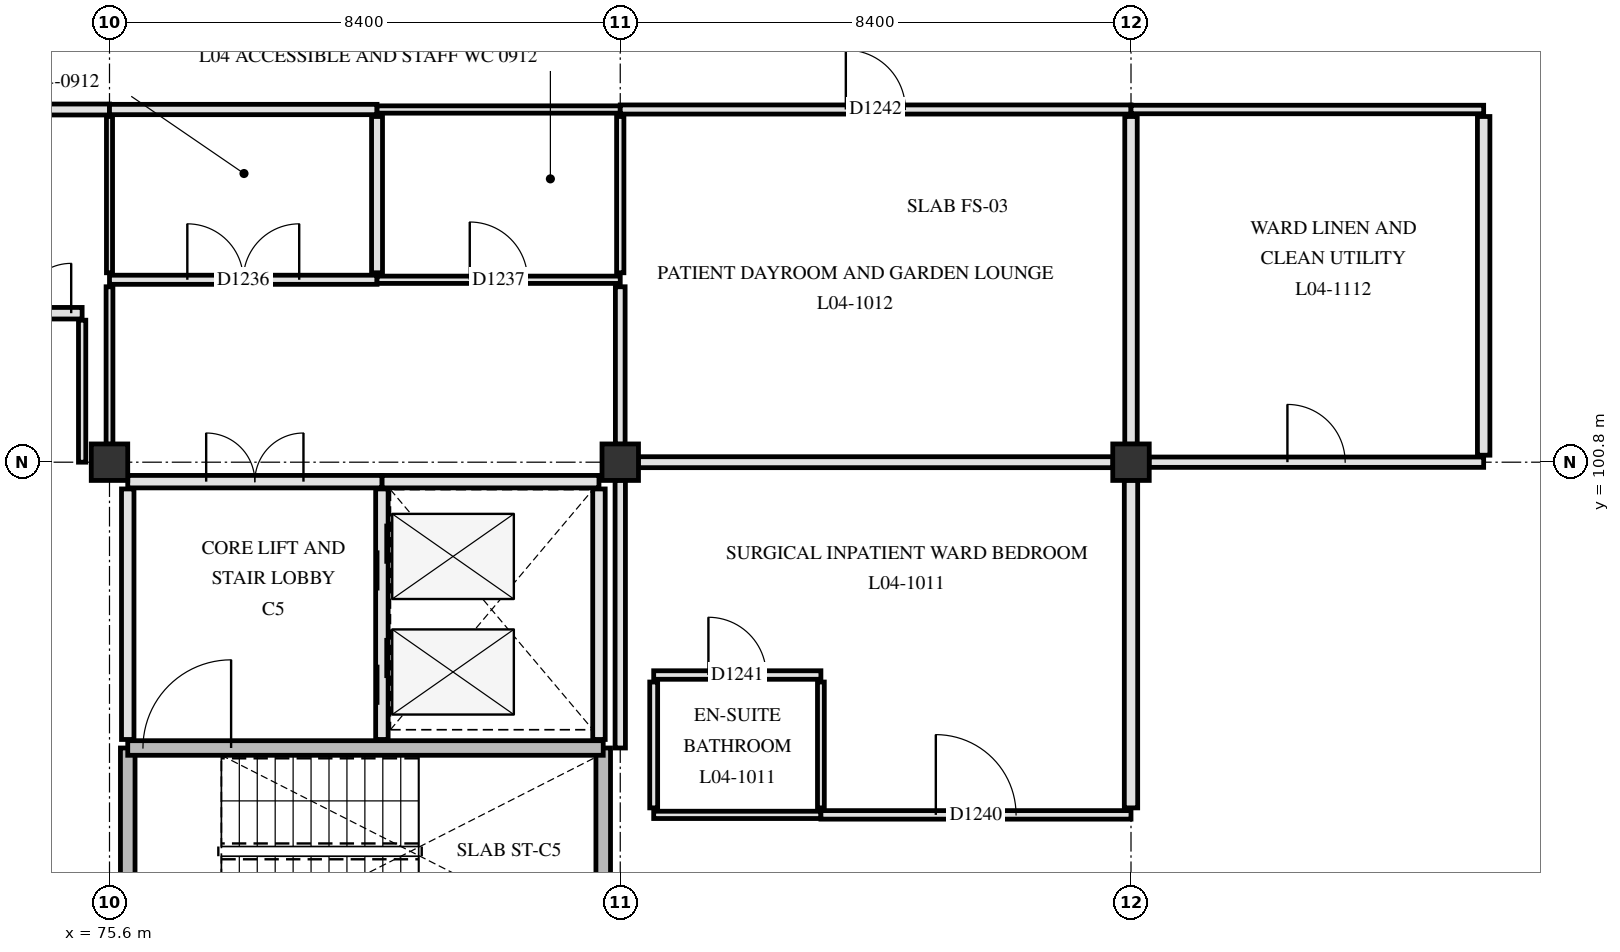
"""IFC4 building model, lengths in metres.
Left out: names, types, materials, properties, quantities, classifications, styles, units other than length and angle.
Written with IfcOpenShell. Run it as: python <this file> out.ifc"""

import sys

from ifc_helpers import new_model, si_unit, direction, frame, frame_2d, origin, origin_2d, place, context, subcontext, project, spatial, rectangle, extrude, element, fill, save


model = new_model("IFC4")
c1 = context("Model", 3, precision=1e-05, world=origin(), true_north=direction((0.0, 1.0)))
c2 = subcontext(c1, "Body", "Model", "MODEL_VIEW")
j1 = project(units=[si_unit("LENGTHUNIT", "METRE"), si_unit("PLANEANGLEUNIT", "RADIAN")], contexts=[c1])
p1 = place(None, origin())
s1 = spatial("IfcSite", under=j1, at=p1, CompositionType="ELEMENT")
p2 = place(p1, origin())
s2 = spatial("IfcBuilding", under=s1, at=p2, CompositionType="ELEMENT")
p3 = place(p2, frame((0.0, 0.0, 18.6)))
s3 = spatial("IfcBuildingStorey", under=s2, at=p3, CompositionType="ELEMENT", Elevation=18.6)
for number, where, z_axis, x_axis in (
    (1, (75.6, 100.8, 0.0), (0.0, 0.0, 1.0), (1.0, 0.0, 0.0)),
    (2, (84.0, 100.8, 0.0), (0.0, 0.0, 1.0), (1.0, 0.0, 0.0)),
    (3, (92.4, 100.8, 0.0), (0.0, 0.0, 1.0), (1.0, 0.0, 0.0)),
):
    element("IfcColumn", number, at=place(p3, frame(where, z_axis=z_axis, x_axis=x_axis)), inside=s3, PredefinedType="COLUMN", context=c2, shape_type="SweptSolid", body=[
        extrude(rectangle(XDim=0.6, YDim=0.6, at=origin_2d()), origin(), (0.0, 0.0, 1.0), 3.9),
    ])
for number, where, z_axis, x_axis in (
    (4, (75.9, 92.78, 0.0), (0.0, 0.0, 1.0), (0.0, 1.0, 0.0)),
    (5, (83.72, 92.78, 0.0), (0.0, 0.0, 1.0), (0.0, 1.0, 0.0)),
):
    element("IfcWall", number, at=place(p3, frame(where, z_axis=z_axis, x_axis=x_axis)), inside=s3, PredefinedType="SHEAR", context=c2, shape_type="SweptSolid", body=[
        extrude(rectangle(XDim=3.32, YDim=0.24, at=frame_2d((1.66, 0.0))), origin(), (0.0, 0.0, 1.0), 3.62),
    ])
p4 = place(p3, frame((75.9, 96.1, 0.0), z_axis=(0.0, 0.0, 1.0), x_axis=(1.0, 0.0, 0.0)))
e6 = element("IfcWall", 6, at=p4, inside=s3, PredefinedType="SHEAR", context=c2, shape_type="SweptSolid", body=[
    extrude(rectangle(XDim=7.82, YDim=0.24, at=frame_2d((3.91, 0.0))), origin(), (0.0, 0.0, 1.0), 3.62),
])
p5 = place(p4, frame((0.25, 0.0, 0.0)))
e7 = element("IfcOpeningElement", 7, at=p5, cuts=e6, PredefinedType="OPENING", context=c2, shape_type="SweptSolid", body=[
    extrude(rectangle(XDim=1.45, YDim=2.2, at=frame_2d((0.725, 1.1))), frame((0.0, 0.13, 0.0), z_axis=(0.0, -1.0, 0.0), x_axis=(1.0, 0.0, 0.0)), (0.0, 0.0, 1.0), 0.26),
])
p6 = place(p3, frame((80.08, 96.24, 0.0), z_axis=(0.0, 0.0, 1.0), x_axis=(0.0, 1.0, 0.0)))
e8 = element("IfcWall", 8, at=p6, inside=s3, PredefinedType="PARTITIONING", context=c2, shape_type="SweptSolid", body=[
    extrude(rectangle(XDim=4.12, YDim=0.205, at=frame_2d((2.06, 0.0))), origin(), (0.0, 0.0, 1.0), 3.61),
])
p7 = place(p6, frame((0.57, 0.0, 0.0)))
e9 = element("IfcOpeningElement", 9, at=p7, cuts=e8, PredefinedType="OPENING", context=c2, shape_type="SweptSolid", body=[
    extrude(rectangle(XDim=1.1, YDim=2.15, at=frame_2d((0.55, 1.075))), frame((0.0, 0.113, 0.0), z_axis=(0.0, -1.0, 0.0), x_axis=(1.0, 0.0, 0.0)), (0.0, 0.0, 1.0), 0.225),
])
p8 = place(p6, frame((2.45, 0.0, 0.0)))
e10 = element("IfcOpeningElement", 10, at=p8, cuts=e8, PredefinedType="OPENING", context=c2, shape_type="SweptSolid", body=[
    extrude(rectangle(XDim=1.1, YDim=2.15, at=frame_2d((0.55, 1.075))), frame((0.0, 0.113, 0.0), z_axis=(0.0, -1.0, 0.0), x_axis=(1.0, 0.0, 0.0)), (0.0, 0.0, 1.0), 0.225),
])
p9 = place(p3, frame((83.65, 96.24, 0.0), z_axis=(0.0, 0.0, 1.0), x_axis=(0.0, 1.0, 0.0)))
e11 = element("IfcWall", 11, at=p9, inside=s3, PredefinedType="PARTITIONING", context=c2, shape_type="SweptSolid", body=[
    extrude(rectangle(XDim=4.12, YDim=0.205, at=frame_2d((2.06, 0.0))), origin(), (0.0, 0.0, 1.0), 3.61),
])
p10 = place(p3, frame((80.08, 100.48, 0.0), z_axis=(0.0, 0.0, 1.0), x_axis=(1.0, 0.0, 0.0)))
e12 = element("IfcWall", 12, at=p10, inside=s3, PredefinedType="PARTITIONING", context=c2, shape_type="SweptSolid", body=[
    extrude(rectangle(XDim=3.57, YDim=0.205, at=frame_2d((1.785, 0.0))), origin(), (0.0, 0.0, 1.0), 3.61),
])
p11 = place(p3, frame((75.9, 96.24, 0.0), z_axis=(0.0, 0.0, 1.0), x_axis=(0.0, 1.0, 0.0)))
e13 = element("IfcWall", 13, at=p11, inside=s3, PredefinedType="PARTITIONING", context=c2, shape_type="SweptSolid", body=[
    extrude(rectangle(XDim=4.12, YDim=0.205, at=frame_2d((2.06, 0.0))), origin(), (0.0, 0.0, 1.0), 3.61),
])
p12 = place(p3, frame((75.9, 100.48, 0.0), z_axis=(0.0, 0.0, 1.0), x_axis=(1.0, 0.0, 0.0)))
e14 = element("IfcWall", 14, at=p12, inside=s3, PredefinedType="PARTITIONING", context=c2, shape_type="SweptSolid", body=[
    extrude(rectangle(XDim=4.18, YDim=0.205, at=frame_2d((2.09, 0.0))), origin(), (0.0, 0.0, 1.0), 3.61),
])
p13 = place(p12, frame((1.29, 0.0, 0.0)))
e15 = element("IfcOpeningElement", 15, at=p13, cuts=e14, PredefinedType="OPENING", context=c2, shape_type="SweptSolid", body=[
    extrude(rectangle(XDim=1.6, YDim=2.25, at=frame_2d((0.8, 1.125))), frame((0.0, 0.113, 0.0), z_axis=(0.0, -1.0, 0.0), x_axis=(1.0, 0.0, 0.0)), (0.0, 0.0, 1.0), 0.225),
])
p14 = place(p3, frame((84.55, 95.0, 0.0), z_axis=(0.0, 0.0, 1.0), x_axis=(1.0, 0.0, 0.0)))
e16 = element("IfcWall", 16, at=p14, inside=s3, PredefinedType="PARTITIONING", context=c2, shape_type="SweptSolid", body=[
    extrude(rectangle(XDim=2.75, YDim=0.12, at=frame_2d((1.375, 0.0))), origin(), (0.0, 0.0, 1.0), 3.61),
])
p15 = place(p3, frame((87.3, 95.0, 0.0), z_axis=(0.0, 0.0, 1.0), x_axis=(1.0, 0.0, 0.0)))
e17 = element("IfcWall", 17, at=p15, inside=s3, PredefinedType="PARTITIONING", context=c2, shape_type="SweptSolid", body=[
    extrude(rectangle(XDim=5.1, YDim=0.14, at=frame_2d((2.55, 0.0))), origin(), (0.0, 0.0, 1.0), 3.26),
])
p16 = place(p15, frame((1.89, 0.0, 0.0)))
e18 = element("IfcOpeningElement", 18, at=p16, cuts=e17, PredefinedType="OPENING", context=c2, shape_type="SweptSolid", body=[
    extrude(rectangle(XDim=1.32, YDim=2.18, at=frame_2d((0.66, 1.09))), frame((0.0, 0.08, 0.0), z_axis=(0.0, -1.0, 0.0), x_axis=(1.0, 0.0, 0.0)), (0.0, 0.0, 1.0), 0.16),
])
p17 = place(p3, frame((84.55, 97.3, 0.0), z_axis=(0.0, 0.0, 1.0), x_axis=(1.0, 0.0, 0.0)))
e19 = element("IfcWall", 19, at=p17, inside=s3, PredefinedType="PARTITIONING", context=c2, shape_type="SweptSolid", body=[
    extrude(rectangle(XDim=2.75, YDim=0.14, at=frame_2d((1.375, 0.0))), origin(), (0.0, 0.0, 1.0), 3.61),
])
p18 = place(p17, frame((0.9, 0.0, 0.0)))
e20 = element("IfcOpeningElement", 20, at=p18, cuts=e19, PredefinedType="OPENING", context=c2, shape_type="SweptSolid", body=[
    extrude(rectangle(XDim=0.95, YDim=2.1, at=frame_2d((0.475, 1.05))), frame((0.0, 0.08, 0.0), z_axis=(0.0, -1.0, 0.0), x_axis=(1.0, 0.0, 0.0)), (0.0, 0.0, 1.0), 0.16),
])
p19 = place(p3, frame((84.295, 100.8, 0.0), z_axis=(0.0, 0.0, 1.0), x_axis=(1.0, 0.0, 0.0)))
e21 = element("IfcWall", 21, at=p19, inside=s3, PredefinedType="PARTITIONING", context=c2, shape_type="SweptSolid", body=[
    extrude(rectangle(XDim=7.81, YDim=0.18, at=frame_2d((3.905, 0.0))), origin(), (0.0, 0.0, 1.0), 3.16),
])
p20 = place(p3, frame((92.695, 100.8, 0.0), z_axis=(0.0, 0.0, 1.0), x_axis=(1.0, 0.0, 0.0)))
e22 = element("IfcWall", 22, at=p20, inside=s3, PredefinedType="PARTITIONING", context=c2, shape_type="SweptSolid", body=[
    extrude(rectangle(XDim=5.505, YDim=0.17, at=frame_2d((2.752, 0.0))), origin(), (0.0, 0.0, 1.0), 3.16),
])
p21 = place(p20, frame((2.278, 0.0, 0.0)))
e23 = element("IfcOpeningElement", 23, at=p21, cuts=e22, PredefinedType="OPENING", context=c2, shape_type="SweptSolid", body=[
    extrude(rectangle(XDim=0.95, YDim=2.1, at=frame_2d((0.475, 1.05))), frame((0.0, 0.095, 0.0), z_axis=(0.0, -1.0, 0.0), x_axis=(1.0, 0.0, 0.0)), (0.0, 0.0, 1.0), 0.19),
])
p22 = place(p3, frame((73.15, 103.25, 0.0), z_axis=(0.0, 0.0, 1.0), x_axis=(1.0, 0.0, 0.0)))
e24 = element("IfcWall", 24, at=p22, inside=s3, PredefinedType="PARTITIONING", context=c2, shape_type="SweptSolid", body=[
    extrude(rectangle(XDim=2.0, YDim=0.19, at=frame_2d((1.0, 0.0))), origin(), (0.0, 0.0, 1.0), 3.61),
])
p23 = place(p22, frame((0.18, 0.0, 0.0)))
e25 = element("IfcOpeningElement", 25, at=p23, cuts=e24, PredefinedType="OPENING", context=c2, shape_type="SweptSolid", body=[
    extrude(rectangle(XDim=1.64, YDim=2.28, at=frame_2d((0.82, 1.14))), frame((0.0, 0.105, 0.0), z_axis=(0.0, -1.0, 0.0), x_axis=(1.0, 0.0, 0.0)), (0.0, 0.0, 1.0), 0.21),
])
p24 = place(p3, frame((75.6, 103.8, 0.0), z_axis=(0.0, 0.0, 1.0), x_axis=(1.0, 0.0, 0.0)))
e26 = element("IfcWall", 26, at=p24, inside=s3, PredefinedType="PARTITIONING", context=c2, shape_type="SweptSolid", body=[
    extrude(rectangle(XDim=4.4, YDim=0.15, at=frame_2d((2.2, 0.0))), origin(), (0.0, 0.0, 1.0), 3.26),
])
p25 = place(p24, frame((1.28, 0.0, 0.0)))
e27 = element("IfcOpeningElement", 27, at=p25, cuts=e26, PredefinedType="OPENING", context=c2, shape_type="SweptSolid", body=[
    extrude(rectangle(XDim=1.84, YDim=2.28, at=frame_2d((0.92, 1.14))), frame((0.0, 0.085, 0.0), z_axis=(0.0, -1.0, 0.0), x_axis=(1.0, 0.0, 0.0)), (0.0, 0.0, 1.0), 0.17),
])
p26 = place(p3, frame((80.0, 103.8, 0.0), z_axis=(0.0, 0.0, 1.0), x_axis=(1.0, 0.0, 0.0)))
e28 = element("IfcWall", 28, at=p26, inside=s3, PredefinedType="PARTITIONING", context=c2, shape_type="SweptSolid", body=[
    extrude(rectangle(XDim=4.0, YDim=0.12, at=frame_2d((2.0, 0.0))), origin(), (0.0, 0.0, 1.0), 3.26),
])
p27 = place(p26, frame((1.525, 0.0, 0.0)))
e29 = element("IfcOpeningElement", 29, at=p27, cuts=e28, PredefinedType="OPENING", context=c2, shape_type="SweptSolid", body=[
    extrude(rectangle(XDim=0.95, YDim=2.1, at=frame_2d((0.475, 1.05))), frame((0.0, 0.07, 0.0), z_axis=(0.0, -1.0, 0.0), x_axis=(1.0, 0.0, 0.0)), (0.0, 0.0, 1.0), 0.14),
])
p28 = place(p3, frame((69.8, 106.6, 0.0), z_axis=(0.0, 0.0, 1.0), x_axis=(1.0, 0.0, 0.0)))
e30 = element("IfcWall", 30, at=p28, inside=s3, PredefinedType="PARTITIONING", context=c2, shape_type="SweptSolid", body=[
    extrude(rectangle(XDim=5.8, YDim=0.18, at=frame_2d((2.9, 0.0))), origin(), (0.0, 0.0, 1.0), 3.26),
])
p29 = place(p3, frame((75.6, 106.6, 0.0), z_axis=(0.0, 0.0, 1.0), x_axis=(1.0, 0.0, 0.0)))
e31 = element("IfcWall", 31, at=p29, inside=s3, PredefinedType="PARTITIONING", context=c2, shape_type="SweptSolid", body=[
    extrude(rectangle(XDim=4.4, YDim=0.17, at=frame_2d((2.2, 0.0))), origin(), (0.0, 0.0, 1.0), 3.26),
])
p30 = place(p3, frame((80.0, 106.6, 0.0), z_axis=(0.0, 0.0, 1.0), x_axis=(1.0, 0.0, 0.0)))
e32 = element("IfcWall", 32, at=p30, inside=s3, PredefinedType="PARTITIONING", context=c2, shape_type="SweptSolid", body=[
    extrude(rectangle(XDim=4.0, YDim=0.12, at=frame_2d((2.0, 0.0))), origin(), (0.0, 0.0, 1.0), 3.26),
])
p31 = place(p3, frame((84.0, 106.6, 0.0), z_axis=(0.0, 0.0, 1.0), x_axis=(1.0, 0.0, 0.0)))
e33 = element("IfcWall", 33, at=p31, inside=s3, PredefinedType="PARTITIONING", context=c2, shape_type="SweptSolid", body=[
    extrude(rectangle(XDim=8.4, YDim=0.15, at=frame_2d((4.2, 0.0))), origin(), (0.0, 0.0, 1.0), 3.26),
])
p32 = place(p31, frame((3.71, 0.0, 0.0)))
e34 = element("IfcOpeningElement", 34, at=p32, cuts=e33, PredefinedType="OPENING", context=c2, shape_type="SweptSolid", body=[
    extrude(rectangle(XDim=0.98, YDim=2.12, at=frame_2d((0.49, 1.06))), frame((0.0, 0.085, 0.0), z_axis=(0.0, -1.0, 0.0), x_axis=(1.0, 0.0, 0.0)), (0.0, 0.0, 1.0), 0.17),
])
p33 = place(p3, frame((92.4, 106.6, 0.0), z_axis=(0.0, 0.0, 1.0), x_axis=(1.0, 0.0, 0.0)))
e35 = element("IfcWall", 35, at=p33, inside=s3, PredefinedType="PARTITIONING", context=c2, shape_type="SweptSolid", body=[
    extrude(rectangle(XDim=5.8, YDim=0.14, at=frame_2d((2.9, 0.0))), origin(), (0.0, 0.0, 1.0), 3.26),
])
p34 = place(p3, frame((75.15, 100.8, 0.0), z_axis=(0.0, 0.0, 1.0), x_axis=(0.0, 1.0, 0.0)))
e36 = element("IfcWall", 36, at=p34, inside=s3, PredefinedType="PARTITIONING", context=c2, shape_type="SweptSolid", body=[
    extrude(rectangle(XDim=2.335, YDim=0.12, at=frame_2d((1.167, 0.0))), origin(), (0.0, 0.0, 1.0), 3.16),
])
p35 = place(p3, frame((75.6, 101.095, 0.0), z_axis=(0.0, 0.0, 1.0), x_axis=(0.0, 1.0, 0.0)))
e37 = element("IfcWall", 37, at=p35, inside=s3, PredefinedType="PARTITIONING", context=c2, shape_type="SweptSolid", body=[
    extrude(rectangle(XDim=2.59, YDim=0.112, at=frame_2d((1.295, 0.0))), origin(), (0.0, 0.0, 1.0), 3.26),
])
p36 = place(p3, frame((75.6, 103.915, 0.0), z_axis=(0.0, 0.0, 1.0), x_axis=(0.0, 1.0, 0.0)))
e38 = element("IfcWall", 38, at=p36, inside=s3, PredefinedType="PARTITIONING", context=c2, shape_type="SweptSolid", body=[
    extrude(rectangle(XDim=2.57, YDim=0.1, at=frame_2d((1.285, 0.0))), origin(), (0.0, 0.0, 1.0), 3.26),
])
p37 = place(p3, frame((80.0, 103.915, 0.0), z_axis=(0.0, 0.0, 1.0), x_axis=(0.0, 1.0, 0.0)))
e39 = element("IfcWall", 39, at=p37, inside=s3, PredefinedType="PARTITIONING", context=c2, shape_type="SweptSolid", body=[
    extrude(rectangle(XDim=2.57, YDim=0.18, at=frame_2d((1.285, 0.0))), origin(), (0.0, 0.0, 1.0), 3.31),
])
p38 = place(p3, frame((84.0, 96.1, 0.0), z_axis=(0.0, 0.0, 1.0), x_axis=(0.0, 1.0, 0.0)))
e40 = element("IfcWall", 40, at=p38, inside=s3, PredefinedType="PARTITIONING", context=c2, shape_type="SweptSolid", body=[
    extrude(rectangle(XDim=4.405, YDim=0.17, at=frame_2d((2.202, 0.0))), origin(), (0.0, 0.0, 1.0), 3.26),
])
p39 = place(p3, frame((84.0, 101.095, 0.0), z_axis=(0.0, 0.0, 1.0), x_axis=(0.0, 1.0, 0.0)))
e41 = element("IfcWall", 41, at=p39, inside=s3, PredefinedType="PARTITIONING", context=c2, shape_type="SweptSolid", body=[
    extrude(rectangle(XDim=2.59, YDim=0.16, at=frame_2d((1.295, 0.0))), origin(), (0.0, 0.0, 1.0), 3.26),
])
p40 = place(p3, frame((84.0, 103.915, 0.0), z_axis=(0.0, 0.0, 1.0), x_axis=(0.0, 1.0, 0.0)))
e42 = element("IfcWall", 42, at=p40, inside=s3, PredefinedType="PARTITIONING", context=c2, shape_type="SweptSolid", body=[
    extrude(rectangle(XDim=2.57, YDim=0.12, at=frame_2d((1.285, 0.0))), origin(), (0.0, 0.0, 1.0), 3.26),
])
p41 = place(p3, frame((84.55, 95.115, 0.0), z_axis=(0.0, 0.0, 1.0), x_axis=(0.0, 1.0, 0.0)))
e43 = element("IfcWall", 43, at=p41, inside=s3, PredefinedType="PARTITIONING", context=c2, shape_type="SweptSolid", body=[
    extrude(rectangle(XDim=2.07, YDim=0.13, at=frame_2d((1.035, 0.0))), origin(), (0.0, 0.0, 1.0), 3.31),
])
p42 = place(p3, frame((87.3, 95.115, 0.0), z_axis=(0.0, 0.0, 1.0), x_axis=(0.0, 1.0, 0.0)))
e44 = element("IfcWall", 44, at=p42, inside=s3, PredefinedType="PARTITIONING", context=c2, shape_type="SweptSolid", body=[
    extrude(rectangle(XDim=2.07, YDim=0.112, at=frame_2d((1.035, 0.0))), origin(), (0.0, 0.0, 1.0), 3.31),
])
p43 = place(p3, frame((92.4, 95.115, 0.0), z_axis=(0.0, 0.0, 1.0), x_axis=(0.0, 1.0, 0.0)))
e45 = element("IfcWall", 45, at=p43, inside=s3, PredefinedType="PARTITIONING", context=c2, shape_type="SweptSolid", body=[
    extrude(rectangle(XDim=5.39, YDim=0.22, at=frame_2d((2.695, 0.0))), origin(), (0.0, 0.0, 1.0), 3.26),
])
p44 = place(p3, frame((92.4, 101.095, 0.0), z_axis=(0.0, 0.0, 1.0), x_axis=(0.0, 1.0, 0.0)))
e46 = element("IfcWall", 46, at=p44, inside=s3, PredefinedType="PARTITIONING", context=c2, shape_type="SweptSolid", body=[
    extrude(rectangle(XDim=5.39, YDim=0.205, at=frame_2d((2.695, 0.0))), origin(), (0.0, 0.0, 1.0), 3.26),
])
p45 = place(p3, frame((98.2, 100.915, 0.0), z_axis=(0.0, 0.0, 1.0), x_axis=(0.0, 1.0, 0.0)))
e47 = element("IfcWall", 47, at=p45, inside=s3, PredefinedType="PARTITIONING", context=c2, shape_type="SweptSolid", body=[
    extrude(rectangle(XDim=5.57, YDim=0.205, at=frame_2d((2.785, 0.0))), origin(), (0.0, 0.0, 1.0), 3.31),
])
p46 = place(p5, origin())
e48 = element("IfcDoor", 48, at=p46, inside=s3, OperationType="SINGLE_SWING_RIGHT", PredefinedType="DOOR", context=c2, shape_type="SweptSolid", body=[
    extrude(rectangle(XDim=1.45, YDim=2.2, at=frame_2d((0.725, 1.1))), frame((0.0, 0.025, 0.0), z_axis=(0.0, -1.0, 0.0), x_axis=(1.0, 0.0, 0.0)), (0.0, 0.0, 1.0), 0.05),
])
fill(e7, e48)
p47 = place(p7, origin())
e49 = element("IfcDoor", 49, at=p47, inside=s3, OperationType="SLIDING_TO_LEFT", PredefinedType="DOOR", context=c2, shape_type="SweptSolid", body=[
    extrude(rectangle(XDim=1.1, YDim=2.15, at=frame_2d((0.55, 1.075))), frame((0.0, 0.025, 0.0), z_axis=(0.0, -1.0, 0.0), x_axis=(1.0, 0.0, 0.0)), (0.0, 0.0, 1.0), 0.05),
])
fill(e9, e49)
p48 = place(p8, origin())
e50 = element("IfcDoor", 50, at=p48, inside=s3, OperationType="SLIDING_TO_LEFT", PredefinedType="DOOR", context=c2, shape_type="SweptSolid", body=[
    extrude(rectangle(XDim=1.1, YDim=2.15, at=frame_2d((0.55, 1.075))), frame((0.0, 0.025, 0.0), z_axis=(0.0, -1.0, 0.0), x_axis=(1.0, 0.0, 0.0)), (0.0, 0.0, 1.0), 0.05),
])
fill(e10, e50)
p49 = place(p13, origin())
e51 = element("IfcDoor", 51, at=p49, inside=s3, OperationType="DOUBLE_SWING_LEFT", PredefinedType="DOOR", context=c2, shape_type="SweptSolid", body=[
    extrude(rectangle(XDim=1.6, YDim=2.25, at=frame_2d((0.8, 1.125))), frame((0.0, 0.025, 0.0), z_axis=(0.0, -1.0, 0.0), x_axis=(1.0, 0.0, 0.0)), (0.0, 0.0, 1.0), 0.05),
])
fill(e15, e51)
p50 = place(p23, origin())
e52 = element("IfcDoor", 52, at=p50, inside=s3, OperationType="DOUBLE_SWING_LEFT", PredefinedType="DOOR", context=c2, shape_type="SweptSolid", body=[
    extrude(rectangle(XDim=1.64, YDim=2.28, at=frame_2d((0.82, 1.14))), frame((0.0, 0.025, 0.0), z_axis=(0.0, -1.0, 0.0), x_axis=(1.0, 0.0, 0.0)), (0.0, 0.0, 1.0), 0.05),
])
fill(e25, e52)
p51 = place(p25, origin())
e53 = element("IfcDoor", 53, at=p51, inside=s3, OperationType="DOUBLE_SWING_LEFT", PredefinedType="DOOR", context=c2, shape_type="SweptSolid", body=[
    extrude(rectangle(XDim=1.84, YDim=2.28, at=frame_2d((0.92, 1.14))), frame((0.0, 0.025, 0.0), z_axis=(0.0, -1.0, 0.0), x_axis=(1.0, 0.0, 0.0)), (0.0, 0.0, 1.0), 0.05),
])
fill(e27, e53)
p52 = place(p27, origin())
e54 = element("IfcDoor", 54, at=p52, inside=s3, OperationType="SINGLE_SWING_LEFT", PredefinedType="DOOR", context=c2, shape_type="SweptSolid", body=[
    extrude(rectangle(XDim=0.95, YDim=2.1, at=frame_2d((0.475, 1.05))), frame((0.0, 0.025, 0.0), z_axis=(0.0, -1.0, 0.0), x_axis=(1.0, 0.0, 0.0)), (0.0, 0.0, 1.0), 0.05),
])
fill(e29, e54)
p53 = place(p16, origin())
e55 = element("IfcDoor", 55, at=p53, inside=s3, OperationType="SINGLE_SWING_LEFT", PredefinedType="DOOR", context=c2, shape_type="SweptSolid", body=[
    extrude(rectangle(XDim=1.32, YDim=2.18, at=frame_2d((0.66, 1.09))), frame((0.0, 0.025, 0.0), z_axis=(0.0, -1.0, 0.0), x_axis=(1.0, 0.0, 0.0)), (0.0, 0.0, 1.0), 0.05),
])
fill(e18, e55)
p54 = place(p18, origin())
e56 = element("IfcDoor", 56, at=p54, inside=s3, OperationType="SINGLE_SWING_LEFT", PredefinedType="DOOR", context=c2, shape_type="SweptSolid", body=[
    extrude(rectangle(XDim=0.95, YDim=2.1, at=frame_2d((0.475, 1.05))), frame((0.0, 0.025, 0.0), z_axis=(0.0, -1.0, 0.0), x_axis=(1.0, 0.0, 0.0)), (0.0, 0.0, 1.0), 0.05),
])
fill(e20, e56)
p55 = place(p32, origin())
e57 = element("IfcDoor", 57, at=p55, inside=s3, OperationType="SINGLE_SWING_LEFT", PredefinedType="DOOR", context=c2, shape_type="SweptSolid", body=[
    extrude(rectangle(XDim=0.98, YDim=2.12, at=frame_2d((0.49, 1.06))), frame((0.0, 0.025, 0.0), z_axis=(0.0, -1.0, 0.0), x_axis=(1.0, 0.0, 0.0)), (0.0, 0.0, 1.0), 0.05),
])
fill(e34, e57)
p56 = place(p21, origin())
e58 = element("IfcDoor", 58, at=p56, inside=s3, OperationType="SINGLE_SWING_LEFT", PredefinedType="DOOR", context=c2, shape_type="SweptSolid", body=[
    extrude(rectangle(XDim=0.95, YDim=2.1, at=frame_2d((0.475, 1.05))), frame((0.0, 0.025, 0.0), z_axis=(0.0, -1.0, 0.0), x_axis=(1.0, 0.0, 0.0)), (0.0, 0.0, 1.0), 0.05),
])
fill(e23, e58)
save(model, sys.argv[1])
